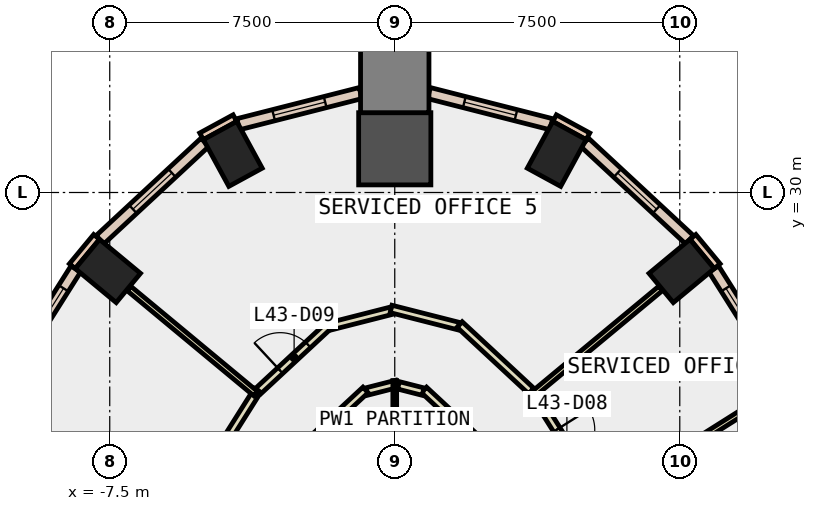
"""IFC4 building model, lengths in metres.
Left out: names, types, materials, properties, quantities, classifications, styles, units other than length and angle.
Written with IfcOpenShell. Run it as: python <this file> out.ifc"""

import sys

from ifc_helpers import new_model, si_unit, direction, frame, frame_2d, origin, origin_2d, place, context, subcontext, project, spatial, rectangle, extrude, element, fill, save


model = new_model("IFC4")
c1 = context("Model", 3, precision=1e-05, world=origin(), true_north=direction((0.0, 1.0)))
c2 = subcontext(c1, "Body", "Model", "MODEL_VIEW")
j1 = project(units=[si_unit("LENGTHUNIT", "METRE"), si_unit("PLANEANGLEUNIT", "RADIAN")], contexts=[c1])
p1 = place(None, origin())
s1 = spatial("IfcSite", under=j1, at=p1, CompositionType="ELEMENT")
p2 = place(p1, origin())
s2 = spatial("IfcBuilding", under=s1, at=p2, CompositionType="ELEMENT")
p3 = place(p2, frame((0.0, 0.0, 194.0)))
s3 = spatial("IfcBuildingStorey", under=s2, at=p3, CompositionType="ELEMENT", Elevation=194.0)
for number, where, z_axis, x_axis in (
    (1, (7.549, 27.935, -0.4), (0.0, 0.0, 1.0), (-0.639, 0.769, 0.0)),
    (2, (4.262, 31.015, -0.4), (0.0, 0.0, 1.0), (-0.878, 0.478, 0.0)),
):
    element("IfcColumn", number, at=place(p3, frame(where, z_axis=z_axis, x_axis=x_axis)), inside=s3, PredefinedType="COLUMN", context=c2, shape_type="SweptSolid", body=[
        extrude(rectangle(XDim=1.0, YDim=1.4, at=origin_2d()), origin(), (0.0, 0.0, 1.0), 4.2),
    ])
p4 = place(p3, frame((0.0, 31.15, -0.4), z_axis=(0.0, 0.0, 1.0), x_axis=(0.0, 1.0, 0.0)))
e3 = element("IfcColumn", 3, at=p4, inside=s3, PredefinedType="COLUMN", context=c2, shape_type="SweptSolid", body=[
    extrude(rectangle(XDim=1.9, YDim=1.9, at=origin_2d()), origin(), (0.0, 0.0, 1.0), 4.2),
])
for number, where, z_axis, x_axis in (
    (4, (-4.262, 31.015, -0.4), (0.0, 0.0, 1.0), (0.878, 0.478, 0.0)),
    (5, (-7.549, 27.935, -0.4), (0.0, 0.0, 1.0), (0.639, 0.769, 0.0)),
):
    element("IfcColumn", number, at=place(p3, frame(where, z_axis=z_axis, x_axis=x_axis)), inside=s3, PredefinedType="COLUMN", context=c2, shape_type="SweptSolid", body=[
        extrude(rectangle(XDim=1.0, YDim=1.4, at=origin_2d()), origin(), (0.0, 0.0, 1.0), 4.2),
    ])
p5 = place(p3, frame((0.0, 33.0, -0.4), z_axis=(0.0, 0.0, 1.0), x_axis=(0.0, 1.0, 0.0)))
e6 = element("IfcColumn", 6, at=p5, inside=s3, PredefinedType="COLUMN", context=c2, shape_type="SweptSolid", body=[
    extrude(rectangle(XDim=1.8, YDim=1.8, at=origin_2d()), origin(), (0.0, 0.0, 1.0), 4.2),
])
for number, where, z_axis, x_axis in (
    (7, (5.084, 31.478, 0.0), (0.0, 0.0, 1.0), (-0.878, 0.478, 0.0)),
    (8, (-4.206, 31.956, 0.0), (0.0, 0.0, 1.0), (-0.878, -0.478, 0.0)),
):
    element("IfcWall", number, at=place(p3, frame(where, z_axis=z_axis, x_axis=x_axis)), inside=s3, PredefinedType="STANDARD", context=c2, shape_type="SweptSolid", body=[
        extrude(rectangle(XDim=1.0, YDim=0.2, at=frame_2d((0.5, 0.0))), origin(), (0.0, 0.0, 1.0), 3.8),
    ])
for number, where, z_axis, x_axis in (
    (9, (8.484, 28.061, 0.0), (0.0, 0.0, 1.0), (-0.638, 0.77, 0.0)),
    (10, (-7.846, 28.831, 0.0), (0.0, 0.0, 1.0), (-0.638, -0.77, 0.0)),
):
    element("IfcWall", number, at=place(p3, frame(where, z_axis=z_axis, x_axis=x_axis)), inside=s3, PredefinedType="STANDARD", context=c2, shape_type="SweptSolid", body=[
        extrude(rectangle(XDim=1.0, YDim=0.2, at=frame_2d((0.5, 0.0))), origin(), (0.0, 0.0, 1.0), 3.8),
    ])
p6 = place(p3, frame((12.241, 21.892, 0.0), z_axis=(0.0, 0.0, 1.0), x_axis=(-0.533680752529, 0.845686025887, 0.0)))
e11 = element("IfcWall", 11, at=p6, inside=s3, PredefinedType="STANDARD", context=c2, shape_type="SweptSolid", body=[
    extrude(rectangle(XDim=7.208, YDim=0.3, at=frame_2d((3.604, 0.0))), origin(), (0.0, 0.0, 1.0), 3.8),
])
p7 = place(p6, frame((0.602, 0.0, 0.9)))
e12 = element("IfcOpeningElement", 12, at=p7, cuts=e11, PredefinedType="OPENING", context=c2, shape_type="SweptSolid", body=[
    extrude(rectangle(XDim=2.4, YDim=2.6, at=frame_2d((1.2, 1.3))), frame((0.0, 0.16, 0.0), z_axis=(0.0, -1.0, 0.0), x_axis=(1.0, 0.0, 0.0)), (0.0, 0.0, 1.0), 0.32),
])
p8 = place(p6, frame((4.206, 0.0, 0.9)))
e13 = element("IfcOpeningElement", 13, at=p8, cuts=e11, PredefinedType="OPENING", context=c2, shape_type="SweptSolid", body=[
    extrude(rectangle(XDim=2.4, YDim=2.6, at=frame_2d((1.2, 1.3))), frame((0.0, 0.16, 0.0), z_axis=(0.0, -1.0, 0.0), x_axis=(1.0, 0.0, 0.0)), (0.0, 0.0, 1.0), 0.32),
])
p9 = place(p3, frame((7.757, 28.756, 0.0), z_axis=(0.0, 0.0, 1.0), x_axis=(-0.732897351132, 0.680339233547, 0.0)))
e14 = element("IfcWall", 14, at=p9, inside=s3, PredefinedType="STANDARD", context=c2, shape_type="SweptSolid", body=[
    extrude(rectangle(XDim=3.767, YDim=0.3, at=frame_2d((1.884, 0.0))), origin(), (0.0, 0.0, 1.0), 3.8),
])
p10 = place(p9, frame((1.184, 0.0, 0.9)))
e15 = element("IfcOpeningElement", 15, at=p10, cuts=e14, PredefinedType="OPENING", context=c2, shape_type="SweptSolid", body=[
    extrude(rectangle(XDim=1.4, YDim=2.6, at=frame_2d((0.7, 1.3))), frame((0.0, 0.16, 0.0), z_axis=(0.0, -1.0, 0.0), x_axis=(1.0, 0.0, 0.0)), (0.0, 0.0, 1.0), 0.32),
])
p11 = place(p3, frame((4.12, 31.796, 0.0), z_axis=(0.0, 0.0, 1.0), x_axis=(-0.969087915137, 0.24671565158, 0.0)))
e16 = element("IfcWall", 16, at=p11, inside=s3, PredefinedType="STANDARD", context=c2, shape_type="SweptSolid", body=[
    extrude(rectangle(XDim=3.324, YDim=0.3, at=frame_2d((1.662, 0.0))), origin(), (0.0, 0.0, 1.0), 3.8),
])
p12 = place(p11, frame((0.962, 0.0, 0.9)))
e17 = element("IfcOpeningElement", 17, at=p12, cuts=e16, PredefinedType="OPENING", context=c2, shape_type="SweptSolid", body=[
    extrude(rectangle(XDim=1.4, YDim=2.6, at=frame_2d((0.7, 1.3))), frame((0.0, 0.16, 0.0), z_axis=(0.0, -1.0, 0.0), x_axis=(1.0, 0.0, 0.0)), (0.0, 0.0, 1.0), 0.32),
])
p13 = place(p3, frame((-0.899, 32.616, 0.0), z_axis=(0.0, 0.0, 1.0), x_axis=(-0.969087915137, -0.24671565158, 0.0)))
e18 = element("IfcWall", 18, at=p13, inside=s3, PredefinedType="STANDARD", context=c2, shape_type="SweptSolid", body=[
    extrude(rectangle(XDim=3.324, YDim=0.3, at=frame_2d((1.662, 0.0))), origin(), (0.0, 0.0, 1.0), 3.8),
])
p14 = place(p13, frame((0.962, 0.0, 0.9)))
e19 = element("IfcOpeningElement", 19, at=p14, cuts=e18, PredefinedType="OPENING", context=c2, shape_type="SweptSolid", body=[
    extrude(rectangle(XDim=1.4, YDim=2.6, at=frame_2d((0.7, 1.3))), frame((0.0, 0.16, 0.0), z_axis=(0.0, -1.0, 0.0), x_axis=(1.0, 0.0, 0.0)), (0.0, 0.0, 1.0), 0.32),
])
p15 = place(p3, frame((-4.996, 31.319, 0.0), z_axis=(0.0, 0.0, 1.0), x_axis=(-0.732897351132, -0.680339233547, 0.0)))
e20 = element("IfcWall", 20, at=p15, inside=s3, PredefinedType="STANDARD", context=c2, shape_type="SweptSolid", body=[
    extrude(rectangle(XDim=3.767, YDim=0.3, at=frame_2d((1.884, 0.0))), origin(), (0.0, 0.0, 1.0), 3.8),
])
p16 = place(p15, frame((1.184, 0.0, 0.9)))
e21 = element("IfcOpeningElement", 21, at=p16, cuts=e20, PredefinedType="OPENING", context=c2, shape_type="SweptSolid", body=[
    extrude(rectangle(XDim=1.4, YDim=2.6, at=frame_2d((0.7, 1.3))), frame((0.0, 0.16, 0.0), z_axis=(0.0, -1.0, 0.0), x_axis=(1.0, 0.0, 0.0)), (0.0, 0.0, 1.0), 0.32),
])
p17 = place(p3, frame((-8.394, 27.988, 0.0), z_axis=(0.0, 0.0, 1.0), x_axis=(-0.533680752529, -0.845686025887, 0.0)))
e22 = element("IfcWall", 22, at=p17, inside=s3, PredefinedType="STANDARD", context=c2, shape_type="SweptSolid", body=[
    extrude(rectangle(XDim=7.208, YDim=0.3, at=frame_2d((3.604, 0.0))), origin(), (0.0, 0.0, 1.0), 3.8),
])
p18 = place(p17, frame((0.602, 0.0, 0.9)))
e23 = element("IfcOpeningElement", 23, at=p18, cuts=e22, PredefinedType="OPENING", context=c2, shape_type="SweptSolid", body=[
    extrude(rectangle(XDim=2.4, YDim=2.6, at=frame_2d((1.2, 1.3))), frame((0.0, 0.16, 0.0), z_axis=(0.0, -1.0, 0.0), x_axis=(1.0, 0.0, 0.0)), (0.0, 0.0, 1.0), 0.32),
])
p19 = place(p17, frame((4.206, 0.0, 0.9)))
e24 = element("IfcOpeningElement", 24, at=p19, cuts=e22, PredefinedType="OPENING", context=c2, shape_type="SweptSolid", body=[
    extrude(rectangle(XDim=2.4, YDim=2.6, at=frame_2d((1.2, 1.3))), frame((0.0, 0.16, 0.0), z_axis=(0.0, -1.0, 0.0), x_axis=(1.0, 0.0, 0.0)), (0.0, 0.0, 1.0), 0.32),
])
p20 = place(p3, frame((2.116, 23.554, 0.0), z_axis=(0.0, 0.0, 1.0), x_axis=(-0.732722533409, 0.680527507919, 0.0)))
e25 = element("IfcWall", 25, at=p20, inside=s3, PredefinedType="PARTITIONING", context=c2, shape_type="SweptSolid", body=[
    extrude(rectangle(XDim=1.838, YDim=0.2, at=frame_2d((0.919, 0.0))), origin(), (0.0, 0.0, 1.0), 3.8),
])
p21 = place(p3, frame((0.745, 24.761, 0.0), z_axis=(0.0, 0.0, 1.0), x_axis=(-0.969081307177, 0.246741605895, 0.0)))
e26 = element("IfcWall", 26, at=p21, inside=s3, PredefinedType="PARTITIONING", context=c2, shape_type="SweptSolid", body=[
    extrude(rectangle(XDim=0.669, YDim=0.2, at=frame_2d((0.334, 0.0))), origin(), (0.0, 0.0, 1.0), 3.8),
])
p22 = place(p3, frame((0.048, 24.963, 0.0), z_axis=(0.0, 0.0, 1.0), x_axis=(-0.969098470359, -0.246674187438, 0.0)))
e27 = element("IfcWall", 27, at=p22, inside=s3, PredefinedType="PARTITIONING", context=c2, shape_type="SweptSolid", body=[
    extrude(rectangle(XDim=0.819, YDim=0.2, at=frame_2d((0.409, 0.0))), origin(), (0.0, 0.0, 1.0), 3.8),
])
p23 = place(p3, frame((-0.769, 24.805, 0.0), z_axis=(0.0, 0.0, 1.0), x_axis=(-0.732722533409, -0.680527507919, 0.0)))
e28 = element("IfcWall", 28, at=p23, inside=s3, PredefinedType="PARTITIONING", context=c2, shape_type="SweptSolid", body=[
    extrude(rectangle(XDim=1.838, YDim=0.2, at=frame_2d((0.919, 0.0))), origin(), (0.0, 0.0, 1.0), 3.8),
])
p24 = place(p3, frame((3.65, 24.731, 0.0), z_axis=(0.0, 0.0, 1.0), x_axis=(0.533756056831, -0.845638499476, 0.0)))
e29 = element("IfcWall", 29, at=p24, inside=s3, PredefinedType="PARTITIONING", context=c2, shape_type="SweptSolid", body=[
    extrude(rectangle(XDim=3.296, YDim=0.2, at=frame_2d((1.648, 0.0))), origin(), (0.0, 0.0, 1.0), 3.8),
])
p25 = place(p24, frame((1.148, 0.0, 0.0)))
e30 = element("IfcOpeningElement", 30, at=p25, cuts=e29, PredefinedType="OPENING", context=c2, shape_type="SweptSolid", body=[
    extrude(rectangle(XDim=1.0, YDim=2.1, at=frame_2d((0.5, 1.05))), frame((0.0, 0.11, 0.0), z_axis=(0.0, -1.0, 0.0), x_axis=(1.0, 0.0, 0.0)), (0.0, 0.0, 1.0), 0.22),
])
p26 = place(p3, frame((-3.59, 24.778, 0.0), z_axis=(0.0, 0.0, 1.0), x_axis=(0.732939008525, 0.680294355248, 0.0)))
e31 = element("IfcWall", 31, at=p26, inside=s3, PredefinedType="PARTITIONING", context=c2, shape_type="SweptSolid", body=[
    extrude(rectangle(XDim=2.569, YDim=0.2, at=frame_2d((1.285, 0.0))), origin(), (0.0, 0.0, 1.0), 3.8),
])
p27 = place(p26, frame((0.785, 0.0, 0.0)))
e32 = element("IfcOpeningElement", 32, at=p27, cuts=e31, PredefinedType="OPENING", context=c2, shape_type="SweptSolid", body=[
    extrude(rectangle(XDim=1.0, YDim=2.1, at=frame_2d((0.5, 1.05))), frame((0.0, 0.11, 0.0), z_axis=(0.0, -1.0, 0.0), x_axis=(1.0, 0.0, 0.0)), (0.0, 0.0, 1.0), 0.22),
])
p28 = place(p3, frame((-1.683, 26.483, 0.0), z_axis=(0.0, 0.0, 1.0), x_axis=(0.969053723172, 0.246849917169, 0.0)))
e33 = element("IfcWall", 33, at=p28, inside=s3, PredefinedType="PARTITIONING", context=c2, shape_type="SweptSolid", body=[
    extrude(rectangle(XDim=1.637, YDim=0.2, at=frame_2d((0.818, 0.0))), origin(), (0.0, 0.0, 1.0), 3.8),
])
p29 = place(p3, frame((-0.097, 26.936, 0.0), z_axis=(0.0, 0.0, 1.0), x_axis=(0.969093707519, -0.246692898252, 0.0)))
e34 = element("IfcWall", 34, at=p29, inside=s3, PredefinedType="PARTITIONING", context=c2, shape_type="SweptSolid", body=[
    extrude(rectangle(XDim=1.837, YDim=0.2, at=frame_2d((0.918, 0.0))), origin(), (0.0, 0.0, 1.0), 3.8),
])
p30 = place(p3, frame((1.707, 26.526, 0.0), z_axis=(0.0, 0.0, 1.0), x_axis=(0.732939008525, -0.680294355248, 0.0)))
e35 = element("IfcWall", 35, at=p30, inside=s3, PredefinedType="PARTITIONING", context=c2, shape_type="SweptSolid", body=[
    extrude(rectangle(XDim=2.569, YDim=0.2, at=frame_2d((1.285, 0.0))), origin(), (0.0, 0.0, 1.0), 3.8),
])
p31 = place(p3, frame((-7.615, 18.449, 0.0), z_axis=(0.0, 0.0, 1.0), x_axis=(0.533699180497, 0.845674396406, 0.0)))
e36 = element("IfcWall", 36, at=p31, inside=s3, PredefinedType="PARTITIONING", context=c2, shape_type="SweptSolid", body=[
    extrude(rectangle(XDim=7.504, YDim=0.2, at=frame_2d((3.752, 0.0))), origin(), (0.0, 0.0, 1.0), 3.8),
])
p32 = place(p31, frame((3.252, 0.0, 0.0)))
e37 = element("IfcOpeningElement", 37, at=p32, cuts=e36, PredefinedType="OPENING", context=c2, shape_type="SweptSolid", body=[
    extrude(rectangle(XDim=1.0, YDim=2.1, at=frame_2d((0.5, 1.05))), frame((0.0, 0.11, 0.0), z_axis=(0.0, -1.0, 0.0), x_axis=(1.0, 0.0, 0.0)), (0.0, 0.0, 1.0), 0.22),
])
p33 = place(p3, frame((0.0, 23.0, 0.0), z_axis=(0.0, 0.0, 1.0), x_axis=(0.0, 1.0, 0.0)))
e38 = element("IfcWall", 38, at=p33, inside=s3, PredefinedType="PARTITIONING", context=c2, shape_type="SweptSolid", body=[
    extrude(rectangle(XDim=2.051, YDim=0.1, at=frame_2d((1.025, 0.0))), origin(), (0.0, 0.0, 1.0), 3.8),
])
p34 = place(p3, frame((5.364, 21.827, 0.0), z_axis=(0.0, 0.0, 1.0), x_axis=(0.845716787596, 0.533632003517, 0.0)))
e39 = element("IfcWall", 39, at=p34, inside=s3, PredefinedType="PARTITIONING", context=c2, shape_type="SweptSolid", body=[
    extrude(rectangle(XDim=5.7, YDim=0.15, at=frame_2d((2.85, 0.0))), origin(), (0.0, 0.0, 1.0), 3.8),
])
p35 = place(p3, frame((3.586, 24.646, 0.0), z_axis=(0.0, 0.0, 1.0), x_axis=(0.769538645463, 0.638600245176, 0.0)))
e40 = element("IfcWall", 40, at=p35, inside=s3, PredefinedType="PARTITIONING", context=c2, shape_type="SweptSolid", body=[
    extrude(rectangle(XDim=4.43, YDim=0.15, at=frame_2d((2.215, 0.0))), origin(), (0.0, 0.0, 1.0), 3.8),
])
p36 = place(p3, frame((-3.663, 24.71, 0.0), z_axis=(0.0, 0.0, 1.0), x_axis=(-0.76953221629, 0.638607992505, 0.0)))
e41 = element("IfcWall", 41, at=p36, inside=s3, PredefinedType="PARTITIONING", context=c2, shape_type="SweptSolid", body=[
    extrude(rectangle(XDim=4.33, YDim=0.15, at=frame_2d((2.165, 0.0))), origin(), (0.0, 0.0, 1.0), 3.8),
])
p37 = place(p8, origin())
e42 = element("IfcWindow", 42, at=p37, inside=s3, PartitioningType="SINGLE_PANEL", PredefinedType="WINDOW", context=c2, shape_type="SweptSolid", body=[
    extrude(rectangle(XDim=2.4, YDim=2.6, at=frame_2d((1.2, 1.3))), frame((0.0, 0.03, 0.0), z_axis=(0.0, -1.0, 0.0), x_axis=(1.0, 0.0, 0.0)), (0.0, 0.0, 1.0), 0.06),
])
fill(e13, e42)
p38 = place(p10, origin())
e43 = element("IfcWindow", 43, at=p38, inside=s3, PartitioningType="SINGLE_PANEL", PredefinedType="WINDOW", context=c2, shape_type="SweptSolid", body=[
    extrude(rectangle(XDim=1.4, YDim=2.6, at=frame_2d((0.7, 1.3))), frame((0.0, 0.03, 0.0), z_axis=(0.0, -1.0, 0.0), x_axis=(1.0, 0.0, 0.0)), (0.0, 0.0, 1.0), 0.06),
])
fill(e15, e43)
p39 = place(p12, origin())
e44 = element("IfcWindow", 44, at=p39, inside=s3, PartitioningType="SINGLE_PANEL", PredefinedType="WINDOW", context=c2, shape_type="SweptSolid", body=[
    extrude(rectangle(XDim=1.4, YDim=2.6, at=frame_2d((0.7, 1.3))), frame((0.0, 0.03, 0.0), z_axis=(0.0, -1.0, 0.0), x_axis=(1.0, 0.0, 0.0)), (0.0, 0.0, 1.0), 0.06),
])
fill(e17, e44)
p40 = place(p14, origin())
e45 = element("IfcWindow", 45, at=p40, inside=s3, PartitioningType="SINGLE_PANEL", PredefinedType="WINDOW", context=c2, shape_type="SweptSolid", body=[
    extrude(rectangle(XDim=1.4, YDim=2.6, at=frame_2d((0.7, 1.3))), frame((0.0, 0.03, 0.0), z_axis=(0.0, -1.0, 0.0), x_axis=(1.0, 0.0, 0.0)), (0.0, 0.0, 1.0), 0.06),
])
fill(e19, e45)
p41 = place(p16, origin())
e46 = element("IfcWindow", 46, at=p41, inside=s3, PartitioningType="SINGLE_PANEL", PredefinedType="WINDOW", context=c2, shape_type="SweptSolid", body=[
    extrude(rectangle(XDim=1.4, YDim=2.6, at=frame_2d((0.7, 1.3))), frame((0.0, 0.03, 0.0), z_axis=(0.0, -1.0, 0.0), x_axis=(1.0, 0.0, 0.0)), (0.0, 0.0, 1.0), 0.06),
])
fill(e21, e46)
p42 = place(p18, origin())
e47 = element("IfcWindow", 47, at=p42, inside=s3, PartitioningType="SINGLE_PANEL", PredefinedType="WINDOW", context=c2, shape_type="SweptSolid", body=[
    extrude(rectangle(XDim=2.4, YDim=2.6, at=frame_2d((1.2, 1.3))), frame((0.0, 0.03, 0.0), z_axis=(0.0, -1.0, 0.0), x_axis=(1.0, 0.0, 0.0)), (0.0, 0.0, 1.0), 0.06),
])
fill(e23, e47)
p43 = place(p25, origin())
e48 = element("IfcDoor", 48, at=p43, inside=s3, OperationType="SINGLE_SWING_LEFT", PredefinedType="DOOR", context=c2, shape_type="SweptSolid", body=[
    extrude(rectangle(XDim=1.0, YDim=2.1, at=frame_2d((0.5, 1.05))), frame((0.0, 0.025, 0.0), z_axis=(0.0, -1.0, 0.0), x_axis=(1.0, 0.0, 0.0)), (0.0, 0.0, 1.0), 0.05),
])
fill(e30, e48)
p44 = place(p27, origin())
e49 = element("IfcDoor", 49, at=p44, inside=s3, OperationType="SINGLE_SWING_LEFT", PredefinedType="DOOR", context=c2, shape_type="SweptSolid", body=[
    extrude(rectangle(XDim=1.0, YDim=2.1, at=frame_2d((0.5, 1.05))), frame((0.0, 0.025, 0.0), z_axis=(0.0, -1.0, 0.0), x_axis=(1.0, 0.0, 0.0)), (0.0, 0.0, 1.0), 0.05),
])
fill(e32, e49)
save(model, sys.argv[1])
